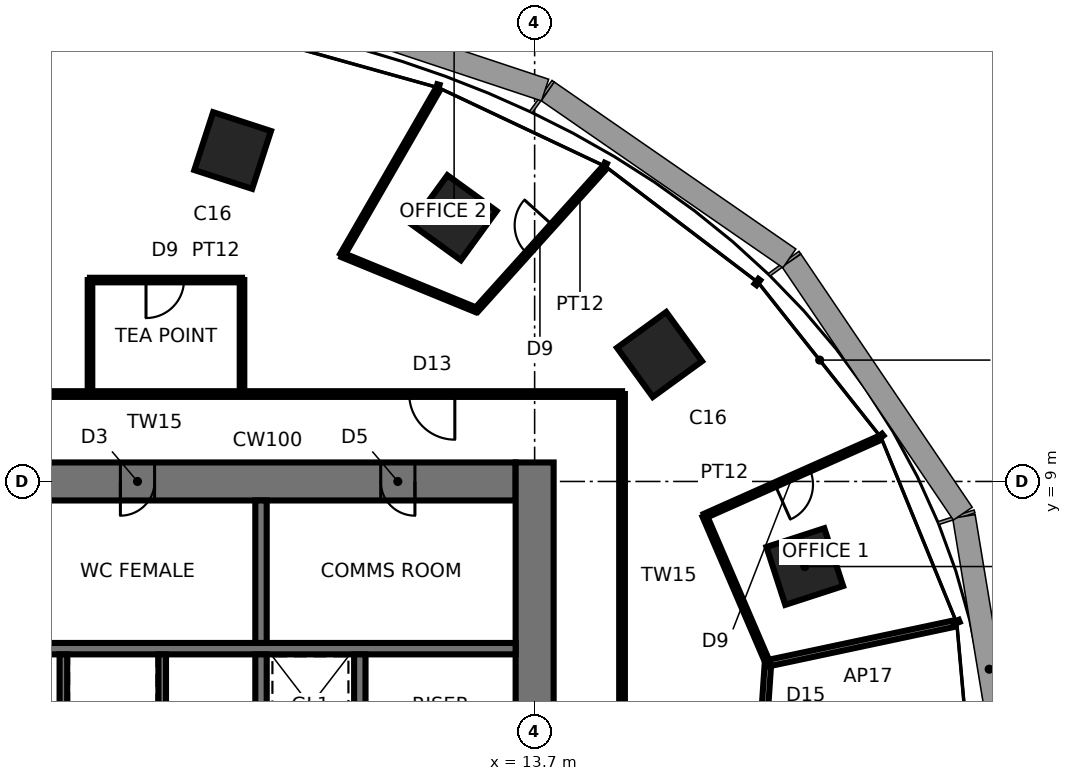
"""IFC4 building model, lengths in metres.
Left out: names, types, materials, properties, quantities, classifications, styles, units other than length and angle.
Written with IfcOpenShell. Run it as: python <this file> out.ifc"""

import sys

from ifc_helpers import new_model, si_unit, direction, frame, frame_2d, origin, origin_2d, place, context, subcontext, project, spatial, rectangle, extrude, element, fill, save


model = new_model("IFC4")
c1 = context("Model", 3, precision=1e-05, world=origin(), true_north=direction((0.0, 1.0)))
c2 = subcontext(c1, "Body", "Model", "MODEL_VIEW")
j1 = project(units=[si_unit("LENGTHUNIT", "METRE"), si_unit("PLANEANGLEUNIT", "RADIAN")], contexts=[c1])
p1 = place(None, origin())
s1 = spatial("IfcSite", under=j1, at=p1, CompositionType="ELEMENT")
p2 = place(p1, origin())
s2 = spatial("IfcBuilding", under=s1, at=p2, CompositionType="ELEMENT")
p3 = place(p2, frame((0.0, 0.0, 127.5)))
s3 = spatial("IfcBuildingStorey", under=s2, at=p3, CompositionType="ELEMENT", Elevation=127.5)
for number, where, z_axis, x_axis in (
    (1, (20.808, 6.761, 0.0), (0.0, 0.0, 1.0), (0.951, 0.309, 0.0)),
    (2, (16.986, 12.341, 0.0), (0.0, 0.0, 1.0), (0.809, 0.588, 0.0)),
    (3, (11.581, 15.94, 0.0), (0.0, 0.0, 1.0), (0.588, 0.809, 0.0)),
    (4, (5.754, 17.708, 0.0), (0.0, 0.0, 1.0), (0.309, 0.951, 0.0)),
):
    element("IfcColumn", number, at=place(p3, frame(where, z_axis=z_axis, x_axis=x_axis)), inside=s3, PredefinedType="COLUMN", context=c2, shape_type="SweptSolid", body=[
        extrude(rectangle(XDim=1.6, YDim=1.6, at=origin_2d()), origin(), (0.0, 0.0, 1.0), 3.9),
    ])
p4 = place(p3, frame((13.2, 9.0, 0.0), z_axis=(0.0, 0.0, 1.0), x_axis=(-1.0, 0.0, 0.0)))
e5 = element("IfcWall", 5, at=p4, inside=s3, PredefinedType="SHEAR", context=c2, shape_type="SweptSolid", body=[
    extrude(rectangle(XDim=26.4, YDim=1.0, at=frame_2d((13.2, 0.0))), origin(), (0.0, 0.0, 1.0), 3.9),
])
p5 = place(p4, frame((2.65, 0.0, 0.0)))
e6 = element("IfcOpeningElement", 6, at=p5, cuts=e5, PredefinedType="OPENING", context=c2, shape_type="SweptSolid", body=[
    extrude(rectangle(XDim=0.9, YDim=2.1, at=frame_2d((0.45, 1.05))), frame((0.0, 0.51, 0.0), z_axis=(0.0, -1.0, 0.0), x_axis=(1.0, 0.0, 0.0)), (0.0, 0.0, 1.0), 1.02),
])
p6 = place(p4, frame((9.5, 0.0, 0.0)))
e7 = element("IfcOpeningElement", 7, at=p6, cuts=e5, PredefinedType="OPENING", context=c2, shape_type="SweptSolid", body=[
    extrude(rectangle(XDim=0.9, YDim=2.1, at=frame_2d((0.45, 1.05))), frame((0.0, 0.51, 0.0), z_axis=(0.0, -1.0, 0.0), x_axis=(1.0, 0.0, 0.0)), (0.0, 0.0, 1.0), 1.02),
])
p7 = place(p4, frame((16.0, 0.0, 0.0)))
e8 = element("IfcOpeningElement", 8, at=p7, cuts=e5, PredefinedType="OPENING", context=c2, shape_type="SweptSolid", body=[
    extrude(rectangle(XDim=0.9, YDim=2.1, at=frame_2d((0.45, 1.05))), frame((0.0, 0.51, 0.0), z_axis=(0.0, -1.0, 0.0), x_axis=(1.0, 0.0, 0.0)), (0.0, 0.0, 1.0), 1.02),
])
p8 = place(p4, frame((21.25, 0.0, 0.0)))
e9 = element("IfcOpeningElement", 9, at=p8, cuts=e5, PredefinedType="OPENING", context=c2, shape_type="SweptSolid", body=[
    extrude(rectangle(XDim=0.9, YDim=2.1, at=frame_2d((0.45, 1.05))), frame((0.0, 0.51, 0.0), z_axis=(0.0, -1.0, 0.0), x_axis=(1.0, 0.0, 0.0)), (0.0, 0.0, 1.0), 1.02),
])
p9 = place(p4, frame((24.8, 0.0, 0.0)))
e10 = element("IfcOpeningElement", 10, at=p9, cuts=e5, PredefinedType="OPENING", context=c2, shape_type="SweptSolid", body=[
    extrude(rectangle(XDim=1.0, YDim=2.1, at=frame_2d((0.5, 1.05))), frame((0.0, 0.51, 0.0), z_axis=(0.0, -1.0, 0.0), x_axis=(1.0, 0.0, 0.0)), (0.0, 0.0, 1.0), 1.02),
])
p10 = place(p3, frame((13.7, -9.5, 0.0), z_axis=(0.0, 0.0, 1.0), x_axis=(0.0, 1.0, 0.0)))
e11 = element("IfcWall", 11, at=p10, inside=s3, PredefinedType="SHEAR", context=c2, shape_type="SweptSolid", body=[
    extrude(rectangle(XDim=19.0, YDim=1.0, at=frame_2d((9.5, 0.0))), origin(), (0.0, 0.0, 1.0), 3.9),
])
p11 = place(p10, frame((8.6, 0.0, 0.0)))
e12 = element("IfcOpeningElement", 12, at=p11, cuts=e11, PredefinedType="OPENING", context=c2, shape_type="SweptSolid", body=[
    extrude(rectangle(XDim=1.8, YDim=2.4, at=frame_2d((0.9, 1.2))), frame((0.0, 0.51, 0.0), z_axis=(0.0, -1.0, 0.0), x_axis=(1.0, 0.0, 0.0)), (0.0, 0.0, 1.0), 1.02),
])
p12 = place(p3, frame((-13.2, 4.6, 0.0), z_axis=(0.0, 0.0, 1.0), x_axis=(1.0, 0.0, 0.0)))
e13 = element("IfcWall", 13, at=p12, inside=s3, PredefinedType="SHEAR", context=c2, shape_type="SweptSolid", body=[
    extrude(rectangle(XDim=26.4, YDim=0.3, at=frame_2d((13.2, 0.0))), origin(), (0.0, 0.0, 1.0), 3.9),
])
p13 = place(p3, frame((6.5, 1.75, 0.0), z_axis=(0.0, 0.0, 1.0), x_axis=(0.0, 1.0, 0.0)))
e14 = element("IfcWall", 14, at=p13, inside=s3, PredefinedType="SHEAR", context=c2, shape_type="SweptSolid", body=[
    extrude(rectangle(XDim=2.7, YDim=0.3, at=frame_2d((1.35, 0.0))), origin(), (0.0, 0.0, 1.0), 3.9),
])
p14 = place(p3, frame((6.5, 4.75, 0.0), z_axis=(0.0, 0.0, 1.0), x_axis=(0.0, 1.0, 0.0)))
e15 = element("IfcWall", 15, at=p14, inside=s3, PredefinedType="SHEAR", context=c2, shape_type="SweptSolid", body=[
    extrude(rectangle(XDim=3.75, YDim=0.3, at=frame_2d((1.875, 0.0))), origin(), (0.0, 0.0, 1.0), 3.9),
])
for number, where, z_axis, x_axis in (
    (16, (1.3, 1.75, 0.0), (0.0, 0.0, 1.0), (0.0, 1.0, 0.0)),
    (17, (3.9, 1.75, 0.0), (0.0, 0.0, 1.0), (0.0, 1.0, 0.0)),
):
    element("IfcWall", number, at=place(p3, frame(where, z_axis=z_axis, x_axis=x_axis)), inside=s3, PredefinedType="SHEAR", context=c2, shape_type="SweptSolid", body=[
        extrude(rectangle(XDim=2.7, YDim=0.2, at=frame_2d((1.35, 0.0))), origin(), (0.0, 0.0, 1.0), 3.9),
    ])
p15 = place(p3, frame((9.1, 1.75, 0.0), z_axis=(0.0, 0.0, 1.0), x_axis=(0.0, 1.0, 0.0)))
e18 = element("IfcWall", 18, at=p15, inside=s3, PredefinedType="SHEAR", context=c2, shape_type="SweptSolid", body=[
    extrude(rectangle(XDim=2.7, YDim=0.3, at=frame_2d((1.35, 0.0))), origin(), (0.0, 0.0, 1.0), 3.9),
])
p16 = place(p3, frame((19.84, 4.217, 0.0), z_axis=(0.0, 0.0, 1.0), x_axis=(-0.067498983032, -0.997719342947, 0.0)))
e19 = element("IfcWall", 19, at=p16, inside=s3, PredefinedType="PARTITIONING", context=c2, shape_type="SweptSolid", body=[
    extrude(rectangle(XDim=8.333, YDim=0.17, at=frame_2d((4.167, 0.0))), origin(), (0.0, 0.0, 1.0), 3.74),
])
p17 = place(p16, frame((1.456, 0.0, 0.0)))
e20 = element("IfcOpeningElement", 20, at=p17, cuts=e19, PredefinedType="OPENING", context=c2, shape_type="SweptSolid", body=[
    extrude(rectangle(XDim=1.1, YDim=2.4, at=frame_2d((0.55, 1.2))), frame((0.0, 0.095, 0.0), z_axis=(0.0, -1.0, 0.0), x_axis=(1.0, 0.0, 0.0)), (0.0, 0.0, 1.0), 0.19),
])
p18 = place(p3, frame((24.73, 5.257, 0.0), z_axis=(0.0, 0.0, 1.0), x_axis=(-0.978149046495, -0.207904888932, 0.0)))
e21 = element("IfcWall", 21, at=p18, inside=s3, PredefinedType="PARTITIONING", context=c2, shape_type="SweptSolid", body=[
    extrude(rectangle(XDim=5.0, YDim=0.17, at=frame_2d((2.5, 0.0))), origin(), (0.0, 0.0, 1.0), 3.74),
])
p19 = place(p3, frame((18.175, 8.092, 0.0), z_axis=(0.0, 0.0, 1.0), x_axis=(0.394806421401, -0.918764327573, 0.0)))
e22 = element("IfcWall", 22, at=p19, inside=s3, PredefinedType="PARTITIONING", context=c2, shape_type="SweptSolid", body=[
    extrude(rectangle(XDim=4.217, YDim=0.12, at=frame_2d((2.109, 0.0))), origin(), (0.0, 0.0, 1.0), 3.74),
])
p20 = place(p3, frame((16.0, 1.7, 0.0), z_axis=(0.0, 0.0, 1.0), x_axis=(0.0, 1.0, 0.0)))
e23 = element("IfcWall", 23, at=p20, inside=s3, PredefinedType="PARTITIONING", context=c2, shape_type="SweptSolid", body=[
    extrude(rectangle(XDim=9.6, YDim=0.15, at=frame_2d((4.8, 0.0))), origin(), (0.0, 0.0, 1.0), 3.74),
])
p21 = place(p3, frame((22.742, 10.125, 0.0), z_axis=(0.0, 0.0, 1.0), x_axis=(-0.913541529049, -0.406745466726, 0.0)))
e24 = element("IfcWall", 24, at=p21, inside=s3, PredefinedType="PARTITIONING", context=c2, shape_type="SweptSolid", body=[
    extrude(rectangle(XDim=5.0, YDim=0.12, at=frame_2d((2.5, 0.0))), origin(), (0.0, 0.0, 1.0), 3.74),
])
p22 = place(p21, frame((1.975, 0.0, 0.0)))
e25 = element("IfcOpeningElement", 25, at=p22, cuts=e24, PredefinedType="OPENING", context=c2, shape_type="SweptSolid", body=[
    extrude(rectangle(XDim=1.0, YDim=2.4, at=frame_2d((0.5, 1.2))), frame((0.0, 0.07, 0.0), z_axis=(0.0, -1.0, 0.0), x_axis=(1.0, 0.0, 0.0)), (0.0, 0.0, 1.0), 0.14),
])
p23 = place(p3, frame((12.167, 13.512, 0.0), z_axis=(0.0, 0.0, 1.0), x_axis=(0.669126573551, 0.743148456614, 0.0)))
e26 = element("IfcWall", 26, at=p23, inside=s3, PredefinedType="PARTITIONING", context=c2, shape_type="SweptSolid", body=[
    extrude(rectangle(XDim=5.0, YDim=0.12, at=frame_2d((2.5, 0.0))), origin(), (0.0, 0.0, 1.0), 3.74),
])
p24 = place(p23, frame((2.0, 0.0, 0.0)))
e27 = element("IfcOpeningElement", 27, at=p24, cuts=e26, PredefinedType="OPENING", context=c2, shape_type="SweptSolid", body=[
    extrude(rectangle(XDim=1.0, YDim=2.4, at=frame_2d((0.5, 1.2))), frame((0.0, 0.07, 0.0), z_axis=(0.0, -1.0, 0.0), x_axis=(1.0, 0.0, 0.0)), (0.0, 0.0, 1.0), 0.14),
])
p25 = place(p3, frame((8.637, 14.959, 0.0), z_axis=(0.0, 0.0, 1.0), x_axis=(0.925323544258, -0.379178504719, 0.0)))
e28 = element("IfcWall", 28, at=p25, inside=s3, PredefinedType="PARTITIONING", context=c2, shape_type="SweptSolid", body=[
    extrude(rectangle(XDim=3.815, YDim=0.12, at=frame_2d((1.907, 0.0))), origin(), (0.0, 0.0, 1.0), 3.74),
])
p26 = place(p3, frame((11.137, 19.289, 0.0), z_axis=(0.0, 0.0, 1.0), x_axis=(-0.499983091616, -0.866035165624, 0.0)))
e29 = element("IfcWall", 29, at=p26, inside=s3, PredefinedType="PARTITIONING", context=c2, shape_type="SweptSolid", body=[
    extrude(rectangle(XDim=5.0, YDim=0.12, at=frame_2d((2.5, 0.0))), origin(), (0.0, 0.0, 1.0), 3.74),
])
p27 = place(p3, frame((6.0, 11.3, 0.0), z_axis=(0.0, 0.0, 1.0), x_axis=(0.0, 1.0, 0.0)))
e30 = element("IfcWall", 30, at=p27, inside=s3, PredefinedType="PARTITIONING", context=c2, shape_type="SweptSolid", body=[
    extrude(rectangle(XDim=3.0, YDim=0.12, at=frame_2d((1.5, 0.0))), origin(), (0.0, 0.0, 1.0), 3.74),
])
p28 = place(p3, frame((16.0, 11.3, 0.0), z_axis=(0.0, 0.0, 1.0), x_axis=(-1.0, 0.0, 0.0)))
e31 = element("IfcWall", 31, at=p28, inside=s3, PredefinedType="PARTITIONING", context=c2, shape_type="SweptSolid", body=[
    extrude(rectangle(XDim=22.0, YDim=0.15, at=frame_2d((11.0, 0.0))), origin(), (0.0, 0.0, 1.0), 3.74),
])
p29 = place(p28, frame((4.4, 0.0, 0.0)))
e32 = element("IfcOpeningElement", 32, at=p29, cuts=e31, PredefinedType="OPENING", context=c2, shape_type="SweptSolid", body=[
    extrude(rectangle(XDim=1.2, YDim=2.4, at=frame_2d((0.6, 1.2))), frame((0.0, 0.085, 0.0), z_axis=(0.0, -1.0, 0.0), x_axis=(1.0, 0.0, 0.0)), (0.0, 0.0, 1.0), 0.17),
])
p30 = place(p28, frame((18.994, 0.0, 0.0)))
e33 = element("IfcOpeningElement", 33, at=p30, cuts=e31, PredefinedType="OPENING", context=c2, shape_type="SweptSolid", body=[
    extrude(rectangle(XDim=1.2, YDim=2.4, at=frame_2d((0.6, 1.2))), frame((0.0, 0.085, 0.0), z_axis=(0.0, -1.0, 0.0), x_axis=(1.0, 0.0, 0.0)), (0.0, 0.0, 1.0), 0.17),
])
p31 = place(p3, frame((6.0, 14.3, 0.0), z_axis=(0.0, 0.0, 1.0), x_axis=(-1.0, 0.0, 0.0)))
e34 = element("IfcWall", 34, at=p31, inside=s3, PredefinedType="PARTITIONING", context=c2, shape_type="SweptSolid", body=[
    extrude(rectangle(XDim=4.0, YDim=0.12, at=frame_2d((2.0, 0.0))), origin(), (0.0, 0.0, 1.0), 3.74),
])
p32 = place(p31, frame((1.526, 0.0, 0.0)))
e35 = element("IfcOpeningElement", 35, at=p32, cuts=e34, PredefinedType="OPENING", context=c2, shape_type="SweptSolid", body=[
    extrude(rectangle(XDim=1.0, YDim=2.4, at=frame_2d((0.5, 1.2))), frame((0.0, 0.07, 0.0), z_axis=(0.0, -1.0, 0.0), x_axis=(1.0, 0.0, 0.0)), (0.0, 0.0, 1.0), 0.14),
])
p33 = place(p3, frame((2.0, 14.3, 0.0), z_axis=(0.0, 0.0, 1.0), x_axis=(0.0, -1.0, 0.0)))
e36 = element("IfcWall", 36, at=p33, inside=s3, PredefinedType="PARTITIONING", context=c2, shape_type="SweptSolid", body=[
    extrude(rectangle(XDim=3.0, YDim=0.12, at=frame_2d((1.5, 0.0))), origin(), (0.0, 0.0, 1.0), 3.74),
])
p34 = place(p5, origin())
e37 = element("IfcDoor", 37, at=p34, inside=s3, OperationType="SINGLE_SWING_LEFT", PredefinedType="DOOR", context=c2, shape_type="SweptSolid", body=[
    extrude(rectangle(XDim=0.82, YDim=2.06, at=frame_2d((0.45, 1.03))), frame((0.0, 0.025, 0.0), z_axis=(0.0, -1.0, 0.0), x_axis=(1.0, 0.0, 0.0)), (0.0, 0.0, 1.0), 0.05),
    extrude(rectangle(XDim=0.04, YDim=2.1, at=frame_2d((0.02, 1.05))), frame((0.0, 0.25, 0.0), z_axis=(0.0, -1.0, 0.0), x_axis=(1.0, 0.0, 0.0)), (0.0, 0.0, 1.0), 0.5),
    extrude(rectangle(XDim=0.04, YDim=2.1, at=frame_2d((0.88, 1.05))), frame((0.0, 0.25, 0.0), z_axis=(0.0, -1.0, 0.0), x_axis=(1.0, 0.0, 0.0)), (0.0, 0.0, 1.0), 0.5),
    extrude(rectangle(XDim=0.82, YDim=0.04, at=frame_2d((0.45, 2.08))), frame((0.0, 0.25, 0.0), z_axis=(0.0, -1.0, 0.0), x_axis=(1.0, 0.0, 0.0)), (0.0, 0.0, 1.0), 0.5),
])
fill(e6, e37)
p35 = place(p6, origin())
e38 = element("IfcDoor", 38, at=p35, inside=s3, OperationType="SINGLE_SWING_RIGHT", PredefinedType="DOOR", context=c2, shape_type="SweptSolid", body=[
    extrude(rectangle(XDim=0.82, YDim=2.06, at=frame_2d((0.45, 1.03))), frame((0.0, 0.025, 0.0), z_axis=(0.0, -1.0, 0.0), x_axis=(1.0, 0.0, 0.0)), (0.0, 0.0, 1.0), 0.05),
    extrude(rectangle(XDim=0.04, YDim=2.1, at=frame_2d((0.02, 1.05))), frame((0.0, 0.25, 0.0), z_axis=(0.0, -1.0, 0.0), x_axis=(1.0, 0.0, 0.0)), (0.0, 0.0, 1.0), 0.5),
    extrude(rectangle(XDim=0.04, YDim=2.1, at=frame_2d((0.88, 1.05))), frame((0.0, 0.25, 0.0), z_axis=(0.0, -1.0, 0.0), x_axis=(1.0, 0.0, 0.0)), (0.0, 0.0, 1.0), 0.5),
    extrude(rectangle(XDim=0.82, YDim=0.04, at=frame_2d((0.45, 2.08))), frame((0.0, 0.25, 0.0), z_axis=(0.0, -1.0, 0.0), x_axis=(1.0, 0.0, 0.0)), (0.0, 0.0, 1.0), 0.5),
])
fill(e7, e38)
p36 = place(p22, origin())
e39 = element("IfcDoor", 39, at=p36, inside=s3, OperationType="SINGLE_SWING_RIGHT", PredefinedType="DOOR", context=c2, shape_type="SweptSolid", body=[
    extrude(rectangle(XDim=1.0, YDim=2.4, at=frame_2d((0.5, 1.2))), frame((0.0, 0.025, 0.0), z_axis=(0.0, -1.0, 0.0), x_axis=(1.0, 0.0, 0.0)), (0.0, 0.0, 1.0), 0.05),
])
fill(e25, e39)
p37 = place(p24, origin())
e40 = element("IfcDoor", 40, at=p37, inside=s3, OperationType="SINGLE_SWING_RIGHT", PredefinedType="DOOR", context=c2, shape_type="SweptSolid", body=[
    extrude(rectangle(XDim=1.0, YDim=2.4, at=frame_2d((0.5, 1.2))), frame((0.0, 0.025, 0.0), z_axis=(0.0, -1.0, 0.0), x_axis=(1.0, 0.0, 0.0)), (0.0, 0.0, 1.0), 0.05),
])
fill(e27, e40)
p38 = place(p32, origin())
e41 = element("IfcDoor", 41, at=p38, inside=s3, OperationType="SINGLE_SWING_RIGHT", PredefinedType="DOOR", context=c2, shape_type="SweptSolid", body=[
    extrude(rectangle(XDim=1.0, YDim=2.4, at=frame_2d((0.5, 1.2))), frame((0.0, 0.025, 0.0), z_axis=(0.0, -1.0, 0.0), x_axis=(1.0, 0.0, 0.0)), (0.0, 0.0, 1.0), 0.05),
])
fill(e35, e41)
p39 = place(p29, origin())
e42 = element("IfcDoor", 42, at=p39, inside=s3, OperationType="SINGLE_SWING_LEFT", PredefinedType="DOOR", context=c2, shape_type="SweptSolid", body=[
    extrude(rectangle(XDim=1.2, YDim=2.4, at=frame_2d((0.6, 1.2))), frame((0.0, 0.025, 0.0), z_axis=(0.0, -1.0, 0.0), x_axis=(1.0, 0.0, 0.0)), (0.0, 0.0, 1.0), 0.05),
])
fill(e32, e42)
save(model, sys.argv[1])
